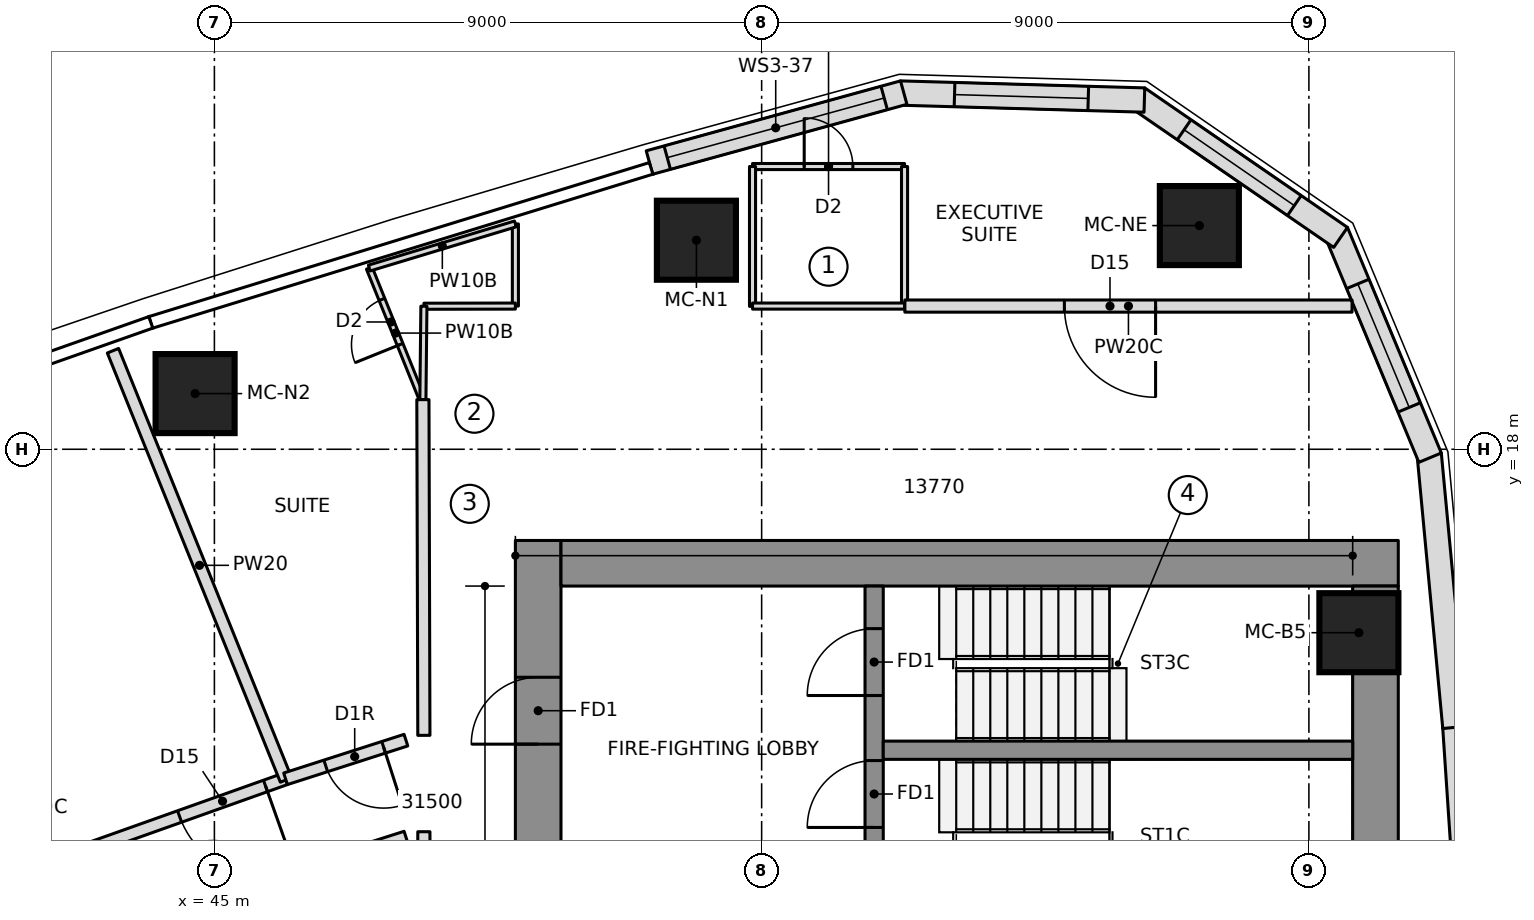
"""IFC4 building model, lengths in metres.
Left out: names, types, materials, properties, quantities, classifications, styles, units other than length and angle.
Written with IfcOpenShell. Run it as: python <this file> out.ifc"""

import sys

from ifc_helpers import new_model, si_unit, direction, frame, frame_2d, origin, origin_2d, place, context, subcontext, project, spatial, polyline, rectangle, outline, extrude, element, fill, save


model = new_model("IFC4")
c1 = context("Model", 3, precision=1e-05, world=origin(), true_north=direction((0.0, 1.0)))
c2 = subcontext(c1, "Body", "Model", "MODEL_VIEW")
j1 = project(units=[si_unit("LENGTHUNIT", "METRE"), si_unit("PLANEANGLEUNIT", "RADIAN")], contexts=[c1])
p1 = place(None, origin())
s1 = spatial("IfcSite", under=j1, at=p1, CompositionType="ELEMENT")
p2 = place(p1, origin())
s2 = spatial("IfcBuilding", under=s1, at=p2, CompositionType="ELEMENT")
p3 = place(p2, frame((0.0, 0.0, 193.25)))
s3 = spatial("IfcBuildingStorey", under=s2, at=p3, CompositionType="ELEMENT", Elevation=193.25)
p4 = place(p3, frame((50.325, 6.65, 0.0), z_axis=(0.0, 0.0, 1.0), x_axis=(0.0, 1.0, 0.0)))
e1 = element("IfcWall", 1, at=p4, inside=s3, PredefinedType="SHEAR", context=c2, shape_type="SweptSolid", body=[
    extrude(rectangle(XDim=9.85, YDim=0.75, at=frame_2d((4.925, 0.0))), origin(), (0.0, 0.0, 1.0), 3.55),
])
p5 = place(p4, frame((6.5, 0.0, 0.0)))
e2 = element("IfcOpeningElement", 2, at=p5, cuts=e1, PredefinedType="OPENING", context=c2, shape_type="SweptSolid", body=[
    extrude(rectangle(XDim=1.1, YDim=2.1, at=frame_2d((0.55, 1.05))), frame((0.0, 0.385, 0.0), z_axis=(0.0, -1.0, 0.0), x_axis=(1.0, 0.0, 0.0)), (0.0, 0.0, 1.0), 0.77),
])
p6 = place(p3, frame((50.7, 16.125, 0.0), z_axis=(0.0, 0.0, 1.0), x_axis=(1.0, 0.0, 0.0)))
e3 = element("IfcWall", 3, at=p6, inside=s3, PredefinedType="SHEAR", context=c2, shape_type="SweptSolid", body=[
    extrude(rectangle(XDim=13.77, YDim=0.75, at=frame_2d((6.885, 0.0))), origin(), (0.0, 0.0, 1.0), 3.55),
])
p7 = place(p3, frame((64.095, 8.099, 0.0), z_axis=(0.0, 0.0, 1.0), x_axis=(0.0, 1.0, 0.0)))
e4 = element("IfcWall", 4, at=p7, inside=s3, PredefinedType="SHEAR", context=c2, shape_type="SweptSolid", body=[
    extrude(rectangle(XDim=7.651, YDim=0.75, at=frame_2d((3.825, 0.0))), origin(), (0.0, 0.0, 1.0), 3.55),
])
p8 = place(p3, frame((55.85, 10.35, 0.0), z_axis=(0.0, 0.0, 1.0), x_axis=(0.0, 1.0, 0.0)))
e5 = element("IfcWall", 5, at=p8, inside=s3, PredefinedType="SHEAR", context=c2, shape_type="SweptSolid", body=[
    extrude(rectangle(XDim=5.4, YDim=0.3, at=frame_2d((2.7, 0.0))), origin(), (0.0, 0.0, 1.0), 3.55),
])
p9 = place(p8, frame((1.43, 0.0, 0.0)))
e6 = element("IfcOpeningElement", 6, at=p9, cuts=e5, PredefinedType="OPENING", context=c2, shape_type="SweptSolid", body=[
    extrude(rectangle(XDim=1.1, YDim=2.1, at=frame_2d((0.55, 1.05))), frame((0.0, 0.16, 0.0), z_axis=(0.0, -1.0, 0.0), x_axis=(1.0, 0.0, 0.0)), (0.0, 0.0, 1.0), 0.32),
])
p10 = place(p8, frame((3.6, 0.0, 0.0)))
e7 = element("IfcOpeningElement", 7, at=p10, cuts=e5, PredefinedType="OPENING", context=c2, shape_type="SweptSolid", body=[
    extrude(rectangle(XDim=1.1, YDim=2.1, at=frame_2d((0.55, 1.05))), frame((0.0, 0.16, 0.0), z_axis=(0.0, -1.0, 0.0), x_axis=(1.0, 0.0, 0.0)), (0.0, 0.0, 1.0), 0.32),
])
p11 = place(p3, frame((56.0, 13.05, 0.0), z_axis=(0.0, 0.0, 1.0), x_axis=(1.0, 0.0, 0.0)))
e8 = element("IfcWall", 8, at=p11, inside=s3, PredefinedType="SHEAR", context=c2, shape_type="SweptSolid", body=[
    extrude(rectangle(XDim=7.72, YDim=0.3, at=frame_2d((3.86, 0.0))), origin(), (0.0, 0.0, 1.0), 3.55),
])
for number, where, z_axis, x_axis in (
    (9, (63.822, 14.983, 0.0), (0.0, 0.0, 1.0), (1.0, 0.0, 0.0)),
    (10, (61.198, 21.679, 0.0), (0.0, 0.0, 1.0), (1.0, 0.0, 0.0)),
    (11, (52.927, 21.438, 0.0), (0.0, 0.0, 1.0), (1.0, 0.0, 0.0)),
    (12, (44.683, 18.916, 0.0), (0.0, 0.0, 1.0), (1.0, 0.0, 0.0)),
):
    element("IfcColumn", number, at=place(p3, frame(where, z_axis=z_axis, x_axis=x_axis)), inside=s3, PredefinedType="COLUMN", context=c2, shape_type="SweptSolid", body=[
        extrude(rectangle(XDim=1.3, YDim=1.3, at=origin_2d()), origin(), (0.0, 0.0, 1.0), 3.55),
    ])
p12 = place(p3, frame((65.7, 8.958, 0.0), z_axis=(0.0, 0.0, 1.0), x_axis=(-0.066905935948, 0.997759287471, 0.0)))
e13 = element("IfcWall", 13, at=p12, inside=s3, PredefinedType="NOTDEFINED", context=c2, shape_type="SweptSolid", body=[
    extrude(outline(polyline([(-0.003, -0.2), (4.484, -0.2), (4.478, 0.2), (0.003, 0.2), (-0.003, -0.2)])), origin(), (0.0, 0.0, 1.0), 3.25),
])
p13 = place(p3, frame((65.401, 13.429, 0.0), z_axis=(0.0, 0.0, 1.0), x_axis=(-0.093605694738, 0.995609348044, 0.0)))
e14 = element("IfcWall", 14, at=p13, inside=s3, PredefinedType="NOTDEFINED", context=c2, shape_type="SweptSolid", body=[
    extrude(outline(polyline([(-0.003, -0.2), (4.511, -0.2), (4.451, 0.2), (0.003, 0.2), (-0.003, -0.2)])), origin(), (0.0, 0.0, 1.0), 3.25),
])
p14 = place(p3, frame((64.981, 17.89, 0.0), z_axis=(0.0, 0.0, 1.0), x_axis=(-0.383997619794, 0.923334082547, 0.0)))
e15 = element("IfcWall", 15, at=p14, inside=s3, PredefinedType="NOTDEFINED", context=c2, shape_type="SweptSolid", body=[
    extrude(outline(polyline([(-0.03, -0.2), (3.988, -0.2), (3.87, 0.2), (0.03, 0.2), (-0.03, -0.2)])), origin(), (0.0, 0.0, 1.0), 3.25),
])
p15 = place(p14, frame((0.865, 0.0, 0.6)))
e16 = element("IfcOpeningElement", 16, at=p15, cuts=e15, PredefinedType="OPENING", context=c2, shape_type="SweptSolid", body=[
    extrude(outline(polyline([(0.0, 1.35), (0.084, 1.771), (0.322, 2.128), (0.679, 2.366), (1.1, 2.45), (1.521, 2.366), (1.878, 2.128), (2.116, 1.771), (2.2, 1.35), (2.2, 1.1), (2.116, 0.679), (1.878, 0.322), (1.521, 0.084), (1.1, 0.0), (0.679, 0.084), (0.322, 0.322), (0.084, 0.679), (0.0, 1.1), (0.0, 1.35)])), frame((0.0, 0.21, 0.0), z_axis=(0.0, -1.0, 0.0), x_axis=(1.0, 0.0, 0.0)), (0.0, 0.0, 1.0), 0.42),
])
p16 = place(p3, frame((63.472, 21.518, 0.0), z_axis=(0.0, 0.0, 1.0), x_axis=(-0.823806162588, 0.566871596115, 0.0)))
e17 = element("IfcWall", 17, at=p16, inside=s3, PredefinedType="NOTDEFINED", context=c2, shape_type="SweptSolid", body=[
    extrude(outline(polyline([(-0.059, -0.2), (3.988, -0.2), (3.87, 0.2), (0.059, 0.2), (-0.059, -0.2)])), origin(), (0.0, 0.0, 1.0), 3.25),
])
p17 = place(p16, frame((0.865, 0.0, 0.6)))
e18 = element("IfcOpeningElement", 18, at=p17, cuts=e17, PredefinedType="OPENING", context=c2, shape_type="SweptSolid", body=[
    extrude(outline(polyline([(0.0, 1.35), (0.084, 1.771), (0.322, 2.128), (0.679, 2.366), (1.1, 2.45), (1.521, 2.366), (1.878, 2.128), (2.116, 1.771), (2.2, 1.35), (2.2, 1.1), (2.116, 0.679), (1.878, 0.322), (1.521, 0.084), (1.1, 0.0), (0.679, 0.084), (0.322, 0.322), (0.084, 0.679), (0.0, 1.1), (0.0, 1.35)])), frame((0.0, 0.21, 0.0), z_axis=(0.0, -1.0, 0.0), x_axis=(1.0, 0.0, 0.0)), (0.0, 0.0, 1.0), 0.42),
])
p18 = place(p3, frame((60.236, 23.745, 0.0), z_axis=(0.0, 0.0, 1.0), x_axis=(-0.999587920197, 0.028705222472, 0.0)))
e19 = element("IfcWall", 19, at=p18, inside=s3, PredefinedType="NOTDEFINED", context=c2, shape_type="SweptSolid", body=[
    extrude(outline(polyline([(-0.059, -0.2), (3.959, -0.2), (3.9, 0.2), (0.059, 0.2), (-0.059, -0.2)])), origin(), (0.0, 0.0, 1.0), 3.25),
])
p19 = place(p18, frame((0.865, 0.0, 0.6)))
e20 = element("IfcOpeningElement", 20, at=p19, cuts=e19, PredefinedType="OPENING", context=c2, shape_type="SweptSolid", body=[
    extrude(outline(polyline([(0.0, 1.35), (0.084, 1.771), (0.322, 2.128), (0.679, 2.366), (1.1, 2.45), (1.521, 2.366), (1.878, 2.128), (2.116, 1.771), (2.2, 1.35), (2.2, 1.1), (2.116, 0.679), (1.878, 0.322), (1.521, 0.084), (1.1, 0.0), (0.679, 0.084), (0.322, 0.322), (0.084, 0.679), (0.0, 1.1), (0.0, 1.35)])), frame((0.0, 0.21, 0.0), z_axis=(0.0, -1.0, 0.0), x_axis=(1.0, 0.0, 0.0)), (0.0, 0.0, 1.0), 0.42),
])
p20 = place(p3, frame((56.308, 23.858, 0.0), z_axis=(0.0, 0.0, 1.0), x_axis=(-0.964205755089, -0.265155165617, 0.0)))
e21 = element("IfcWall", 21, at=p20, inside=s3, PredefinedType="NOTDEFINED", context=c2, shape_type="SweptSolid", body=[
    extrude(outline(polyline([(-0.03, -0.2), (4.307, -0.2), (4.307, 0.2), (0.03, 0.2), (-0.03, -0.2)])), origin(), (0.0, 0.0, 1.0), 3.25),
])
p21 = place(p20, frame((0.303, 0.0, 0.9)))
e22 = element("IfcOpeningElement", 22, at=p21, cuts=e21, PredefinedType="OPENING", context=c2, shape_type="SweptSolid", body=[
    extrude(rectangle(XDim=3.7, YDim=1.8, at=frame_2d((1.85, 0.9))), frame((0.0, 0.21, 0.0), z_axis=(0.0, -1.0, 0.0), x_axis=(1.0, 0.0, 0.0)), (0.0, 0.0, 1.0), 0.42),
])
p22 = place(p3, frame((53.85, 22.65, 0.0), z_axis=(0.0, 0.0, 1.0), x_axis=(1.0, 0.0, 0.0)))
e23 = element("IfcWall", 23, at=p22, inside=s3, PredefinedType="PARTITIONING", context=c2, shape_type="SweptSolid", body=[
    extrude(rectangle(XDim=2.5, YDim=0.1, at=frame_2d((1.25, 0.0))), origin(), (0.0, 0.0, 1.0), 3.25),
])
p23 = place(p22, frame((0.85, 0.0, 0.0)))
e24 = element("IfcOpeningElement", 24, at=p23, cuts=e23, PredefinedType="OPENING", context=c2, shape_type="SweptSolid", body=[
    extrude(rectangle(XDim=0.8, YDim=2.1, at=frame_2d((0.4, 1.05))), frame((0.0, 0.06, 0.0), z_axis=(0.0, -1.0, 0.0), x_axis=(1.0, 0.0, 0.0)), (0.0, 0.0, 1.0), 0.12),
])
for number, where, z_axis, x_axis in (
    (25, (56.35, 22.65, 0.0), (0.0, 0.0, 1.0), (0.0, -1.0, 0.0)),
    (26, (53.85, 20.35, 0.0), (0.0, 0.0, 1.0), (0.0, 1.0, 0.0)),
):
    element("IfcWall", number, at=place(p3, frame(where, z_axis=z_axis, x_axis=x_axis)), inside=s3, PredefinedType="PARTITIONING", context=c2, shape_type="SweptSolid", body=[
        extrude(rectangle(XDim=2.3, YDim=0.1, at=frame_2d((1.15, 0.0))), origin(), (0.0, 0.0, 1.0), 3.25),
    ])
p24 = place(p3, frame((46.17, 12.58, 0.0), z_axis=(0.0, 0.0, 1.0), x_axis=(-0.942170738702, -0.335133255786, 0.0)))
e27 = element("IfcWall", 27, at=p24, inside=s3, PredefinedType="PARTITIONING", context=c2, shape_type="SweptSolid", body=[
    extrude(rectangle(XDim=8.807, YDim=0.2, at=frame_2d((4.404, 0.0))), origin(), (0.0, 0.0, 1.0), 3.25),
])
p25 = place(p24, frame((0.35, 0.0, 0.0)))
e28 = element("IfcOpeningElement", 28, at=p25, cuts=e27, PredefinedType="OPENING", context=c2, shape_type="SweptSolid", body=[
    extrude(rectangle(XDim=1.5, YDim=2.1, at=frame_2d((0.75, 1.05))), frame((0.0, 0.11, 0.0), z_axis=(0.0, -1.0, 0.0), x_axis=(1.0, 0.0, 0.0)), (0.0, 0.0, 1.0), 0.22),
])
p26 = place(p3, frame((46.178, 12.562, 0.0), z_axis=(0.0, 0.0, 1.0), x_axis=(-0.373905590149, 0.927466770108, 0.0)))
e29 = element("IfcWall", 29, at=p26, inside=s3, PredefinedType="PARTITIONING", context=c2, shape_type="SweptSolid", body=[
    extrude(rectangle(XDim=7.611, YDim=0.2, at=frame_2d((3.806, 0.0))), origin(), (0.0, 0.0, 1.0), 3.25),
])
p27 = place(p3, frame((48.409, 18.841, 0.0), z_axis=(0.0, 0.0, 1.0), x_axis=(-0.373908119057, 0.927465750582, 0.0)))
e30 = element("IfcWall", 30, at=p27, inside=s3, PredefinedType="PARTITIONING", context=c2, shape_type="SweptSolid", body=[
    extrude(rectangle(XDim=2.306, YDim=0.1, at=frame_2d((1.153, 0.0))), origin(), (0.0, 0.0, 1.0), 3.25),
])
p28 = place(p27, frame((0.95, 0.0, 0.0)))
e31 = element("IfcOpeningElement", 31, at=p28, cuts=e30, PredefinedType="OPENING", context=c2, shape_type="SweptSolid", body=[
    extrude(rectangle(XDim=0.8, YDim=2.1, at=frame_2d((0.4, 1.05))), frame((0.0, 0.06, 0.0), z_axis=(0.0, -1.0, 0.0), x_axis=(1.0, 0.0, 0.0)), (0.0, 0.0, 1.0), 0.12),
])
p29 = place(p3, frame((63.709, 20.355, 0.0), z_axis=(0.0, 0.0, 1.0), x_axis=(-1.0, 0.0, 0.0)))
e32 = element("IfcWall", 32, at=p29, inside=s3, PredefinedType="PARTITIONING", context=c2, shape_type="SweptSolid", body=[
    extrude(rectangle(XDim=7.354, YDim=0.2, at=frame_2d((3.677, 0.0))), origin(), (0.0, 0.0, 1.0), 3.25),
])
p30 = place(p29, frame((3.231, 0.0, 0.0)))
e33 = element("IfcOpeningElement", 33, at=p30, cuts=e32, PredefinedType="OPENING", context=c2, shape_type="SweptSolid", body=[
    extrude(rectangle(XDim=1.5, YDim=2.1, at=frame_2d((0.75, 1.05))), frame((0.0, 0.11, 0.0), z_axis=(0.0, -1.0, 0.0), x_axis=(1.0, 0.0, 0.0)), (0.0, 0.0, 1.0), 0.22),
])
p31 = place(p3, frame((56.35, 20.355, 0.0), z_axis=(0.0, 0.0, 1.0), x_axis=(-1.0, 0.0, 0.0)))
e34 = element("IfcWall", 34, at=p31, inside=s3, PredefinedType="PARTITIONING", context=c2, shape_type="SweptSolid", body=[
    extrude(rectangle(XDim=2.5, YDim=0.1, at=frame_2d((1.25, 0.0))), origin(), (0.0, 0.0, 1.0), 3.25),
])
p32 = place(p3, frame((49.95, 21.706, 0.0), z_axis=(0.0, 0.0, 1.0), x_axis=(0.0, -1.0, 0.0)))
e35 = element("IfcWall", 35, at=p32, inside=s3, PredefinedType="PARTITIONING", context=c2, shape_type="SweptSolid", body=[
    extrude(rectangle(XDim=1.351, YDim=0.1, at=frame_2d((0.676, 0.0))), origin(), (0.0, 0.0, 1.0), 3.25),
])
p33 = place(p3, frame((49.95, 20.355, 0.0), z_axis=(0.0, 0.0, 1.0), x_axis=(-0.999998406651, -0.001785131852, 0.0)))
e36 = element("IfcWall", 36, at=p33, inside=s3, PredefinedType="PARTITIONING", context=c2, shape_type="SweptSolid", body=[
    extrude(rectangle(XDim=1.504, YDim=0.1, at=frame_2d((0.752, 0.0))), origin(), (0.0, 0.0, 1.0), 3.25),
])
p34 = place(p3, frame((48.446, 20.352, 0.0), z_axis=(0.0, 0.0, 1.0), x_axis=(-0.010805026288, -0.999941624, 0.0)))
e37 = element("IfcWall", 37, at=p34, inside=s3, PredefinedType="PARTITIONING", context=c2, shape_type="SweptSolid", body=[
    extrude(rectangle(XDim=1.536, YDim=0.1, at=frame_2d((0.768, 0.0))), origin(), (0.0, 0.0, 1.0), 3.25),
])
p35 = place(p3, frame((47.547, 20.98, 0.0), z_axis=(0.0, 0.0, 1.0), x_axis=(0.957251518155, 0.289256859885, 0.0)))
e38 = element("IfcWall", 38, at=p35, inside=s3, PredefinedType="PARTITIONING", context=c2, shape_type="SweptSolid", body=[
    extrude(rectangle(XDim=2.51, YDim=0.1, at=frame_2d((1.255, 0.0))), origin(), (0.0, 0.0, 1.0), 3.25),
])
p36 = place(p3, frame((48.15, 13.216, 0.0), z_axis=(0.0, 0.0, 1.0), x_axis=(-0.952101841283, -0.305781104428, 0.0)))
e39 = element("IfcWall", 39, at=p36, inside=s3, PredefinedType="PARTITIONING", context=c2, shape_type="SweptSolid", body=[
    extrude(rectangle(XDim=2.079, YDim=0.2, at=frame_2d((1.04, 0.0))), origin(), (0.0, 0.0, 1.0), 3.25),
])
p37 = place(p36, frame((0.385, 0.0, 0.0)))
e40 = element("IfcOpeningElement", 40, at=p37, cuts=e39, PredefinedType="OPENING", context=c2, shape_type="SweptSolid", body=[
    extrude(rectangle(XDim=1.0, YDim=2.1, at=frame_2d((0.5, 1.05))), frame((0.0, 0.11, 0.0), z_axis=(0.0, -1.0, 0.0), x_axis=(1.0, 0.0, 0.0)), (0.0, 0.0, 1.0), 0.22),
])
p38 = place(p3, frame((46.881, 11.217, 0.0), z_axis=(0.0, 0.0, 1.0), x_axis=(0.952761948983, 0.303718074157, 0.0)))
e41 = element("IfcWall", 41, at=p38, inside=s3, PredefinedType="PARTITIONING", context=c2, shape_type="SweptSolid", body=[
    extrude(rectangle(XDim=1.332, YDim=0.2, at=frame_2d((0.666, 0.0))), origin(), (0.0, 0.0, 1.0), 3.25),
])
p39 = place(p3, frame((48.445, 11.71, 0.0), z_axis=(0.0, 0.0, 1.0), x_axis=(0.0, -1.0, 0.0)))
e42 = element("IfcWall", 42, at=p39, inside=s3, PredefinedType="PARTITIONING", context=c2, shape_type="SweptSolid", body=[
    extrude(rectangle(XDim=23.42, YDim=0.2, at=frame_2d((11.71, 0.0))), origin(), (0.0, 0.0, 1.0), 3.25),
])
p40 = place(p3, frame((48.429, 18.816, 0.0), z_axis=(0.0, 0.0, 1.0), x_axis=(0.002918533604, -0.999995741072, 0.0)))
e43 = element("IfcWall", 43, at=p40, inside=s3, PredefinedType="PARTITIONING", context=c2, shape_type="SweptSolid", body=[
    extrude(rectangle(XDim=5.521, YDim=0.2, at=frame_2d((2.76, 0.0))), origin(), (0.0, 0.0, 1.0), 3.25),
])
p41 = place(p15, origin())
e44 = element("IfcWindow", 44, at=p41, inside=s3, PartitioningType="SINGLE_PANEL", PredefinedType="WINDOW", context=c2, shape_type="SweptSolid", body=[
    extrude(outline(polyline([(0.0, 1.35), (0.084, 1.771), (0.322, 2.128), (0.679, 2.366), (1.1, 2.45), (1.521, 2.366), (1.878, 2.128), (2.116, 1.771), (2.2, 1.35), (2.2, 1.1), (2.116, 0.679), (1.878, 0.322), (1.521, 0.084), (1.1, 0.0), (0.679, 0.084), (0.322, 0.322), (0.084, 0.679), (0.0, 1.1), (0.0, 1.35)])), frame((0.0, 0.17, 0.0), z_axis=(0.0, -1.0, 0.0), x_axis=(1.0, 0.0, 0.0)), (0.0, 0.0, 1.0), 0.06),
])
fill(e16, e44)
p42 = place(p17, origin())
e45 = element("IfcWindow", 45, at=p42, inside=s3, PartitioningType="SINGLE_PANEL", PredefinedType="WINDOW", context=c2, shape_type="SweptSolid", body=[
    extrude(outline(polyline([(0.0, 1.35), (0.084, 1.771), (0.322, 2.128), (0.679, 2.366), (1.1, 2.45), (1.521, 2.366), (1.878, 2.128), (2.116, 1.771), (2.2, 1.35), (2.2, 1.1), (2.116, 0.679), (1.878, 0.322), (1.521, 0.084), (1.1, 0.0), (0.679, 0.084), (0.322, 0.322), (0.084, 0.679), (0.0, 1.1), (0.0, 1.35)])), frame((0.0, 0.17, 0.0), z_axis=(0.0, -1.0, 0.0), x_axis=(1.0, 0.0, 0.0)), (0.0, 0.0, 1.0), 0.06),
])
fill(e18, e45)
p43 = place(p19, origin())
e46 = element("IfcWindow", 46, at=p43, inside=s3, PartitioningType="SINGLE_PANEL", PredefinedType="WINDOW", context=c2, shape_type="SweptSolid", body=[
    extrude(outline(polyline([(0.0, 1.35), (0.084, 1.771), (0.322, 2.128), (0.679, 2.366), (1.1, 2.45), (1.521, 2.366), (1.878, 2.128), (2.116, 1.771), (2.2, 1.35), (2.2, 1.1), (2.116, 0.679), (1.878, 0.322), (1.521, 0.084), (1.1, 0.0), (0.679, 0.084), (0.322, 0.322), (0.084, 0.679), (0.0, 1.1), (0.0, 1.35)])), frame((0.0, 0.17, 0.0), z_axis=(0.0, -1.0, 0.0), x_axis=(1.0, 0.0, 0.0)), (0.0, 0.0, 1.0), 0.06),
])
fill(e20, e46)
p44 = place(p21, origin())
e47 = element("IfcWindow", 47, at=p44, inside=s3, PartitioningType="SINGLE_PANEL", PredefinedType="WINDOW", context=c2, shape_type="SweptSolid", body=[
    extrude(rectangle(XDim=3.7, YDim=1.8, at=frame_2d((1.85, 0.9))), frame((0.0, 0.17, 0.0), z_axis=(0.0, -1.0, 0.0), x_axis=(1.0, 0.0, 0.0)), (0.0, 0.0, 1.0), 0.06),
])
fill(e22, e47)
p45 = place(p23, origin())
e48 = element("IfcDoor", 48, at=p45, inside=s3, OperationType="SINGLE_SWING_LEFT", PredefinedType="DOOR", context=c2, shape_type="SweptSolid", body=[
    extrude(rectangle(XDim=0.8, YDim=2.1, at=frame_2d((0.4, 1.05))), frame((0.0, 0.025, 0.0), z_axis=(0.0, -1.0, 0.0), x_axis=(1.0, 0.0, 0.0)), (0.0, 0.0, 1.0), 0.05),
])
fill(e24, e48)
p46 = place(p25, origin())
e49 = element("IfcDoor", 49, at=p46, inside=s3, OperationType="DOUBLE_DOOR_SINGLE_SWING", PredefinedType="DOOR", context=c2, shape_type="SweptSolid", body=[
    extrude(rectangle(XDim=1.5, YDim=2.1, at=frame_2d((0.75, 1.05))), frame((0.0, 0.025, 0.0), z_axis=(0.0, -1.0, 0.0), x_axis=(1.0, 0.0, 0.0)), (0.0, 0.0, 1.0), 0.05),
])
fill(e28, e49)
p47 = place(p28, origin())
e50 = element("IfcDoor", 50, at=p47, inside=s3, OperationType="SINGLE_SWING_LEFT", PredefinedType="DOOR", context=c2, shape_type="SweptSolid", body=[
    extrude(rectangle(XDim=0.8, YDim=2.1, at=frame_2d((0.4, 1.05))), frame((0.0, 0.025, 0.0), z_axis=(0.0, -1.0, 0.0), x_axis=(1.0, 0.0, 0.0)), (0.0, 0.0, 1.0), 0.05),
])
fill(e31, e50)
p48 = place(p37, origin())
e51 = element("IfcDoor", 51, at=p48, inside=s3, OperationType="SINGLE_SWING_RIGHT", PredefinedType="DOOR", context=c2, shape_type="SweptSolid", body=[
    extrude(rectangle(XDim=1.0, YDim=2.1, at=frame_2d((0.5, 1.05))), frame((0.0, 0.025, 0.0), z_axis=(0.0, -1.0, 0.0), x_axis=(1.0, 0.0, 0.0)), (0.0, 0.0, 1.0), 0.05),
])
fill(e40, e51)
p49 = place(p30, origin())
e52 = element("IfcDoor", 52, at=p49, inside=s3, OperationType="DOUBLE_DOOR_SINGLE_SWING", PredefinedType="DOOR", context=c2, shape_type="SweptSolid", body=[
    extrude(rectangle(XDim=1.5, YDim=2.1, at=frame_2d((0.75, 1.05))), frame((0.0, 0.025, 0.0), z_axis=(0.0, -1.0, 0.0), x_axis=(1.0, 0.0, 0.0)), (0.0, 0.0, 1.0), 0.05),
])
fill(e33, e52)
p50 = place(p9, origin())
e53 = element("IfcDoor", 53, at=p50, inside=s3, OperationType="SINGLE_SWING_RIGHT", PredefinedType="DOOR", context=c2, shape_type="SweptSolid", body=[
    extrude(rectangle(XDim=1.1, YDim=2.1, at=frame_2d((0.55, 1.05))), frame((0.0, 0.025, 0.0), z_axis=(0.0, -1.0, 0.0), x_axis=(1.0, 0.0, 0.0)), (0.0, 0.0, 1.0), 0.05),
])
fill(e6, e53)
p51 = place(p10, origin())
e54 = element("IfcDoor", 54, at=p51, inside=s3, OperationType="SINGLE_SWING_RIGHT", PredefinedType="DOOR", context=c2, shape_type="SweptSolid", body=[
    extrude(rectangle(XDim=1.1, YDim=2.1, at=frame_2d((0.55, 1.05))), frame((0.0, 0.025, 0.0), z_axis=(0.0, -1.0, 0.0), x_axis=(1.0, 0.0, 0.0)), (0.0, 0.0, 1.0), 0.05),
])
fill(e7, e54)
p52 = place(p5, origin())
e55 = element("IfcDoor", 55, at=p52, inside=s3, OperationType="SINGLE_SWING_RIGHT", PredefinedType="DOOR", context=c2, shape_type="SweptSolid", body=[
    extrude(rectangle(XDim=1.1, YDim=2.1, at=frame_2d((0.55, 1.05))), frame((0.0, 0.025, 0.0), z_axis=(0.0, -1.0, 0.0), x_axis=(1.0, 0.0, 0.0)), (0.0, 0.0, 1.0), 0.05),
])
fill(e2, e55)
save(model, sys.argv[1])
